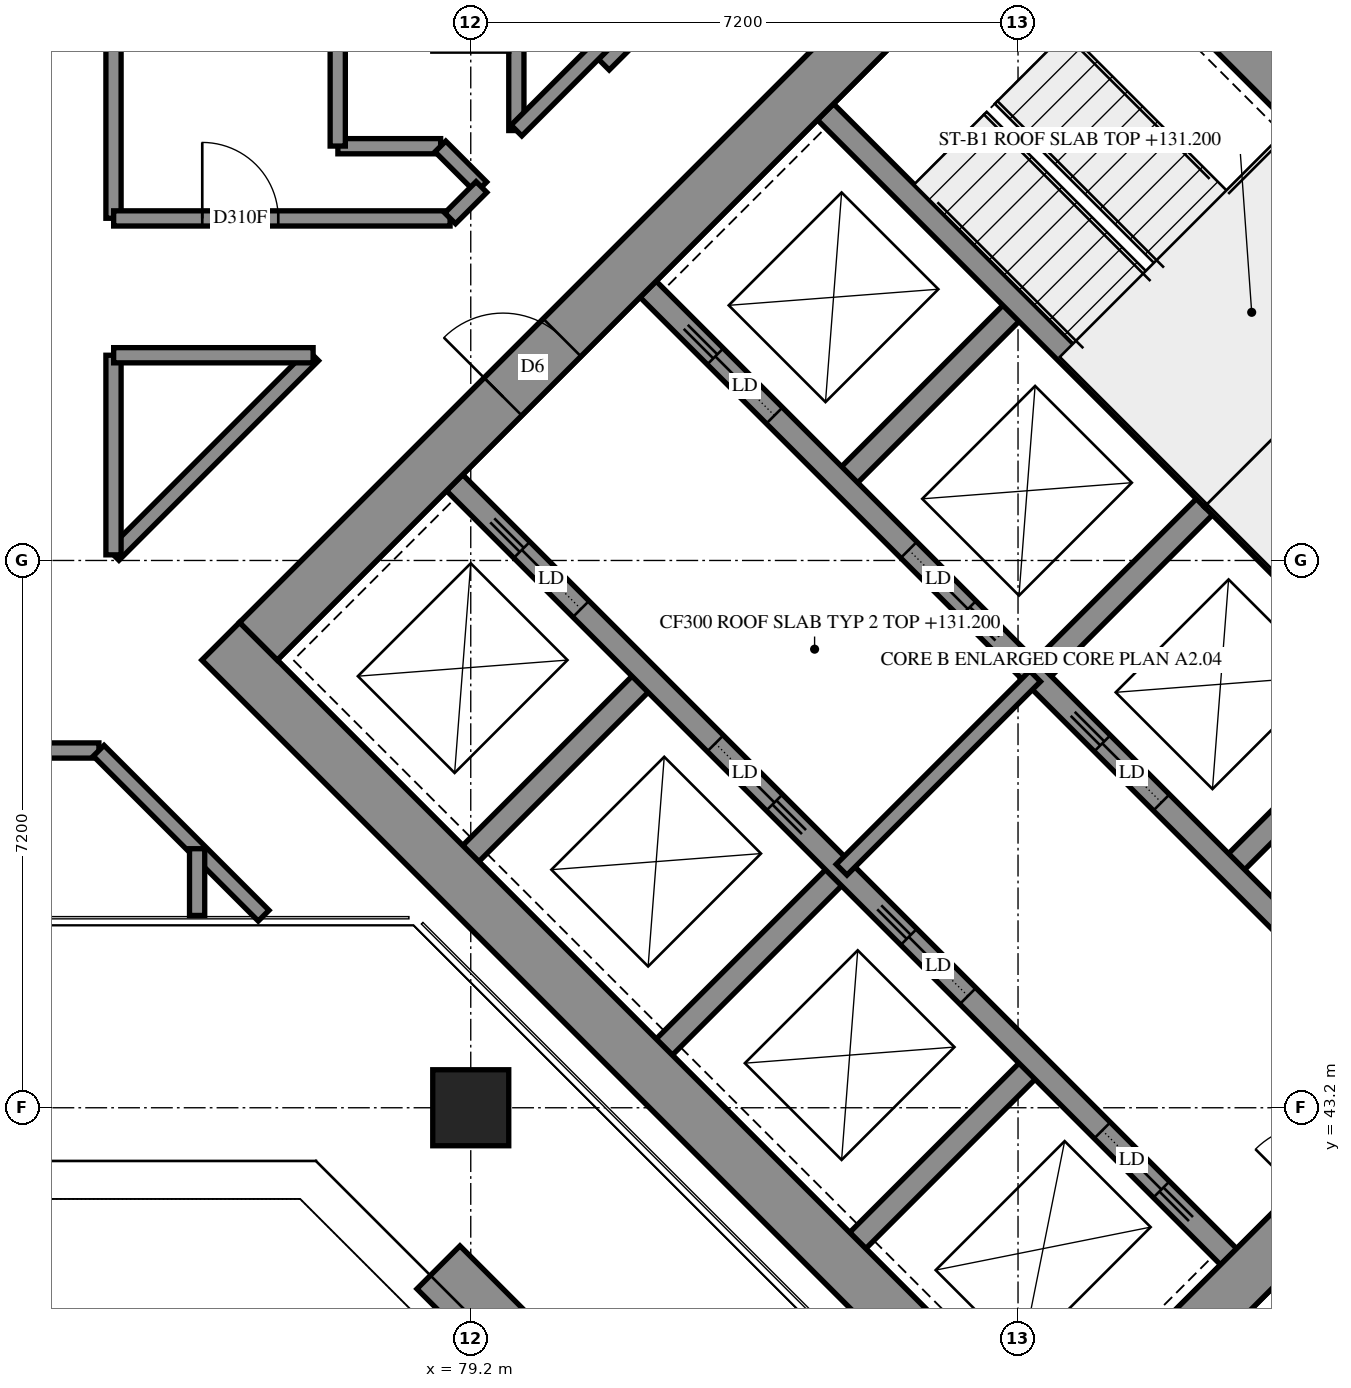
"""IFC4 building model, lengths in metres.
Left out: names, types, materials, properties, quantities, classifications, styles, units other than length and angle.
Written with IfcOpenShell. Run it as: python <this file> out.ifc"""

import sys

from ifc_helpers import new_model, si_unit, direction, frame, frame_2d, origin, origin_2d, place, context, subcontext, project, spatial, rectangle, extrude, element, fill, save


model = new_model("IFC4")
c1 = context("Model", 3, precision=1e-05, world=origin(), true_north=direction((0.0, 1.0)))
c2 = subcontext(c1, "Body", "Model", "MODEL_VIEW")
j1 = project(units=[si_unit("LENGTHUNIT", "METRE"), si_unit("PLANEANGLEUNIT", "RADIAN")], contexts=[c1])
p1 = place(None, origin())
s1 = spatial("IfcSite", under=j1, at=p1, CompositionType="ELEMENT")
p2 = place(p1, origin())
s2 = spatial("IfcBuilding", under=s1, at=p2, CompositionType="ELEMENT")
p3 = place(p2, frame((0.0, 0.0, 131.2)))
s3 = spatial("IfcBuildingStorey", under=s2, at=p3, CompositionType="ELEMENT", Elevation=131.2)
p4 = place(p3, frame((79.2, 43.2, 0.0), z_axis=(0.0, 0.0, 1.0), x_axis=(1.0, 0.0, 0.0)))
e1 = element("IfcColumn", 1, at=p4, inside=s3, PredefinedType="COLUMN", context=c2, shape_type="SweptSolid", body=[
    extrude(rectangle(XDim=1.0, YDim=1.0, at=origin_2d()), origin(), (0.0, 0.0, 1.0), 3.9),
])
p5 = place(p3, frame((75.912, 49.337, -0.3), z_axis=(0.0, 0.0, 1.0), x_axis=(0.7071036166, -0.7071099457, 0.0)))
e2 = element("IfcWall", 2, at=p5, inside=s3, PredefinedType="SHEAR", context=c2, shape_type="SweptSolid", body=[
    extrude(rectangle(XDim=15.8, YDim=0.7, at=frame_2d((7.9, 0.0))), origin(), (0.0, 0.0, 1.0), 3.5),
])
p6 = place(p3, frame((86.589, 60.014, -0.3), z_axis=(0.0, 0.0, 1.0), x_axis=(0.7071099457, -0.7071036166, 0.0)))
e3 = element("IfcWall", 3, at=p6, inside=s3, PredefinedType="SHEAR", context=c2, shape_type="SweptSolid", body=[
    extrude(rectangle(XDim=15.8, YDim=0.7, at=frame_2d((7.9, 0.0))), origin(), (0.0, 0.0, 1.0), 3.5),
])
p7 = place(p6, frame((10.7, 0.0, 0.3)))
e4 = element("IfcOpeningElement", 4, at=p7, cuts=e3, PredefinedType="OPENING", context=c2, shape_type="SweptSolid", body=[
    extrude(rectangle(XDim=0.8, YDim=2.1, at=frame_2d((0.4, 1.05))), frame((0.0, 0.36, 0.0), z_axis=(0.0, -1.0, 0.0), x_axis=(1.0, 0.0, 0.0)), (0.0, 0.0, 1.0), 0.72),
])
p8 = place(p3, frame((76.407, 49.337, -0.3), z_axis=(0.0, 0.0, 1.0), x_axis=(0.7071067812, 0.7071067812, 0.0)))
e5 = element("IfcWall", 5, at=p8, inside=s3, PredefinedType="SHEAR", context=c2, shape_type="SweptSolid", body=[
    extrude(rectangle(XDim=14.4, YDim=0.7, at=frame_2d((7.2, 0.0))), origin(), (0.0, 0.0, 1.0), 3.5),
])
p9 = place(p8, frame((4.55, 0.0, 0.3)))
e6 = element("IfcOpeningElement", 6, at=p9, cuts=e5, PredefinedType="OPENING", context=c2, shape_type="SweptSolid", body=[
    extrude(rectangle(XDim=1.1, YDim=2.1, at=frame_2d((0.55, 1.05))), frame((0.0, 0.36, 0.0), z_axis=(0.0, -1.0, 0.0), x_axis=(1.0, 0.0, 0.0)), (0.0, 0.0, 1.0), 0.72),
])
p10 = place(p8, frame((11.35, 0.0, 0.3)))
e7 = element("IfcOpeningElement", 7, at=p10, cuts=e5, PredefinedType="OPENING", context=c2, shape_type="SweptSolid", body=[
    extrude(rectangle(XDim=1.1, YDim=2.1, at=frame_2d((0.55, 1.05))), frame((0.0, 0.36, 0.0), z_axis=(0.0, -1.0, 0.0), x_axis=(1.0, 0.0, 0.0)), (0.0, 0.0, 1.0), 0.72),
])
p11 = place(p3, frame((87.084, 38.66, -0.3), z_axis=(0.0, 0.0, 1.0), x_axis=(0.7071067812, 0.7071067812, 0.0)))
e8 = element("IfcWall", 8, at=p11, inside=s3, PredefinedType="SHEAR", context=c2, shape_type="SweptSolid", body=[
    extrude(rectangle(XDim=14.4, YDim=0.7, at=frame_2d((7.2, 0.0))), origin(), (0.0, 0.0, 1.0), 3.5),
])
p12 = place(p11, frame((4.55, 0.0, 0.3)))
e9 = element("IfcOpeningElement", 9, at=p12, cuts=e8, PredefinedType="OPENING", context=c2, shape_type="SweptSolid", body=[
    extrude(rectangle(XDim=1.1, YDim=2.1, at=frame_2d((0.55, 1.05))), frame((0.0, 0.36, 0.0), z_axis=(0.0, -1.0, 0.0), x_axis=(1.0, 0.0, 0.0)), (0.0, 0.0, 1.0), 0.72),
])
p13 = place(p11, frame((11.35, 0.0, 0.3)))
e10 = element("IfcOpeningElement", 10, at=p13, cuts=e8, PredefinedType="OPENING", context=c2, shape_type="SweptSolid", body=[
    extrude(rectangle(XDim=1.1, YDim=2.1, at=frame_2d((0.55, 1.05))), frame((0.0, 0.36, 0.0), z_axis=(0.0, -1.0, 0.0), x_axis=(1.0, 0.0, 0.0)), (0.0, 0.0, 1.0), 0.72),
])
for number, where, z_axis, x_axis in (
    (11, (79.2, 46.544, 0.0), (0.0, 0.0, 1.0), (0.707, 0.707, 0.0)),
    (12, (84.079, 51.423, 0.0), (0.0, 0.0, 1.0), (0.707, 0.707, 0.0)),
):
    element("IfcWall", number, at=place(p3, frame(where, z_axis=z_axis, x_axis=x_axis)), inside=s3, PredefinedType="SOLIDWALL", context=c2, shape_type="SweptSolid", body=[
        extrude(rectangle(XDim=3.3, YDim=0.3, at=frame_2d((1.65, 0.0))), origin(), (0.0, 0.0, 1.0), 3.9),
    ])
p14 = place(p3, frame((81.746, 43.999, 0.0), z_axis=(0.0, 0.0, 1.0), x_axis=(0.7071067812, 0.7071067812, 0.0)))
e13 = element("IfcWall", 13, at=p14, inside=s3, PredefinedType="SOLIDWALL", context=c2, shape_type="SweptSolid", body=[
    extrude(rectangle(XDim=3.3, YDim=0.3, at=frame_2d((1.65, 0.0))), origin(), (0.0, 0.0, 1.0), 3.9),
])
p15 = place(p3, frame((86.625, 48.878, 0.0), z_axis=(0.0, 0.0, 1.0), x_axis=(0.7071067812, 0.7071067812, 0.0)))
e14 = element("IfcWall", 14, at=p15, inside=s3, PredefinedType="SOLIDWALL", context=c2, shape_type="SweptSolid", body=[
    extrude(rectangle(XDim=3.3, YDim=0.3, at=frame_2d((1.65, 0.0))), origin(), (0.0, 0.0, 1.0), 3.9),
])
p16 = place(p3, frame((84.291, 41.453, 0.0), z_axis=(0.0, 0.0, 1.0), x_axis=(0.7071067812, 0.7071067812, 0.0)))
e15 = element("IfcWall", 15, at=p16, inside=s3, PredefinedType="SOLIDWALL", context=c2, shape_type="SweptSolid", body=[
    extrude(rectangle(XDim=3.3, YDim=0.3, at=frame_2d((1.65, 0.0))), origin(), (0.0, 0.0, 1.0), 3.9),
])
p17 = place(p3, frame((89.17, 46.332, 0.0), z_axis=(0.0, 0.0, 1.0), x_axis=(0.7071067812, 0.7071067812, 0.0)))
e16 = element("IfcWall", 16, at=p17, inside=s3, PredefinedType="SOLIDWALL", context=c2, shape_type="SweptSolid", body=[
    extrude(rectangle(XDim=3.3, YDim=0.3, at=frame_2d((1.65, 0.0))), origin(), (0.0, 0.0, 1.0), 3.9),
])
p18 = place(p3, frame((78.988, 51.423, 0.0), z_axis=(0.0, 0.0, 1.0), x_axis=(0.7071067812, -0.7071067812, 0.0)))
e17 = element("IfcWall", 17, at=p18, inside=s3, PredefinedType="SOLIDWALL", context=c2, shape_type="SweptSolid", body=[
    extrude(rectangle(XDim=14.4, YDim=0.3, at=frame_2d((7.2, 0.0))), origin(), (0.0, 0.0, 1.0), 3.9),
])
p19 = place(p18, frame((1.25, 0.0, 0.0)))
e18 = element("IfcOpeningElement", 18, at=p19, cuts=e17, PredefinedType="OPENING", context=c2, shape_type="SweptSolid", body=[
    extrude(rectangle(XDim=1.1, YDim=2.1, at=frame_2d((0.55, 1.05))), frame((0.0, 0.16, 0.0), z_axis=(0.0, -1.0, 0.0), x_axis=(1.0, 0.0, 0.0)), (0.0, 0.0, 1.0), 0.32),
])
p20 = place(p18, frame((4.85, 0.0, 0.0)))
e19 = element("IfcOpeningElement", 19, at=p20, cuts=e17, PredefinedType="OPENING", context=c2, shape_type="SweptSolid", body=[
    extrude(rectangle(XDim=1.1, YDim=2.1, at=frame_2d((0.55, 1.05))), frame((0.0, 0.16, 0.0), z_axis=(0.0, -1.0, 0.0), x_axis=(1.0, 0.0, 0.0)), (0.0, 0.0, 1.0), 0.32),
])
p21 = place(p18, frame((8.45, 0.0, 0.0)))
e20 = element("IfcOpeningElement", 20, at=p21, cuts=e17, PredefinedType="OPENING", context=c2, shape_type="SweptSolid", body=[
    extrude(rectangle(XDim=1.1, YDim=2.1, at=frame_2d((0.55, 1.05))), frame((0.0, 0.16, 0.0), z_axis=(0.0, -1.0, 0.0), x_axis=(1.0, 0.0, 0.0)), (0.0, 0.0, 1.0), 0.32),
])
p22 = place(p18, frame((12.05, 0.0, 0.0)))
e21 = element("IfcOpeningElement", 21, at=p22, cuts=e17, PredefinedType="OPENING", context=c2, shape_type="SweptSolid", body=[
    extrude(rectangle(XDim=1.1, YDim=2.1, at=frame_2d((0.55, 1.05))), frame((0.0, 0.16, 0.0), z_axis=(0.0, -1.0, 0.0), x_axis=(1.0, 0.0, 0.0)), (0.0, 0.0, 1.0), 0.32),
])
p23 = place(p3, frame((81.534, 53.969, 0.0), z_axis=(0.0, 0.0, 1.0), x_axis=(0.707103309, -0.7071102534, 0.0)))
e22 = element("IfcWall", 22, at=p23, inside=s3, PredefinedType="SOLIDWALL", context=c2, shape_type="SweptSolid", body=[
    extrude(rectangle(XDim=14.4, YDim=0.3, at=frame_2d((7.2, 0.0))), origin(), (0.0, 0.0, 1.0), 3.9),
])
p24 = place(p23, frame((1.25, 0.0, 0.0)))
e23 = element("IfcOpeningElement", 23, at=p24, cuts=e22, PredefinedType="OPENING", context=c2, shape_type="SweptSolid", body=[
    extrude(rectangle(XDim=1.1, YDim=2.1, at=frame_2d((0.55, 1.05))), frame((0.0, 0.16, 0.0), z_axis=(0.0, -1.0, 0.0), x_axis=(1.0, 0.0, 0.0)), (0.0, 0.0, 1.0), 0.32),
])
p25 = place(p23, frame((4.85, 0.0, 0.0)))
e24 = element("IfcOpeningElement", 24, at=p25, cuts=e22, PredefinedType="OPENING", context=c2, shape_type="SweptSolid", body=[
    extrude(rectangle(XDim=1.1, YDim=2.1, at=frame_2d((0.55, 1.05))), frame((0.0, 0.16, 0.0), z_axis=(0.0, -1.0, 0.0), x_axis=(1.0, 0.0, 0.0)), (0.0, 0.0, 1.0), 0.32),
])
p26 = place(p23, frame((8.45, 0.0, 0.0)))
e25 = element("IfcOpeningElement", 25, at=p26, cuts=e22, PredefinedType="OPENING", context=c2, shape_type="SweptSolid", body=[
    extrude(rectangle(XDim=1.1, YDim=2.1, at=frame_2d((0.55, 1.05))), frame((0.0, 0.16, 0.0), z_axis=(0.0, -1.0, 0.0), x_axis=(1.0, 0.0, 0.0)), (0.0, 0.0, 1.0), 0.32),
])
p27 = place(p23, frame((12.05, 0.0, 0.0)))
e26 = element("IfcOpeningElement", 26, at=p27, cuts=e22, PredefinedType="OPENING", context=c2, shape_type="SweptSolid", body=[
    extrude(rectangle(XDim=1.1, YDim=2.1, at=frame_2d((0.55, 1.05))), frame((0.0, 0.16, 0.0), z_axis=(0.0, -1.0, 0.0), x_axis=(1.0, 0.0, 0.0)), (0.0, 0.0, 1.0), 0.32),
])
for number, where, z_axis, x_axis in (
    (27, (83.867, 56.302, 0.0), (0.0, 0.0, 1.0), (0.707, -0.707, 0.0)),
    (28, (88.958, 51.211, 0.0), (0.0, 0.0, 1.0), (0.707, -0.707, 0.0)),
):
    element("IfcWall", number, at=place(p3, frame(where, z_axis=z_axis, x_axis=x_axis)), inside=s3, PredefinedType="SOLIDWALL", context=c2, shape_type="SweptSolid", body=[
        extrude(rectangle(XDim=7.2, YDim=0.3, at=frame_2d((3.6, 0.0))), origin(), (0.0, 0.0, 1.0), 3.9),
    ])
p28 = place(p3, frame((88.958, 51.211, 0.0), z_axis=(0.0, 0.0, 1.0), x_axis=(0.7071067812, 0.7071067812, 0.0)))
e29 = element("IfcWall", 29, at=p28, inside=s3, PredefinedType="SOLIDWALL", context=c2, shape_type="SweptSolid", body=[
    extrude(rectangle(XDim=4.2, YDim=0.3, at=frame_2d((2.1, 0.0))), origin(), (0.0, 0.0, 1.0), 3.9),
])
p29 = place(p3, frame((78.775, 41.1, 0.0), z_axis=(0.0, 0.0, 1.0), x_axis=(0.7071067812, -0.7071067812, 0.0)))
e30 = element("IfcWall", 30, at=p29, inside=s3, PredefinedType="SOLIDWALL", context=c2, shape_type="SweptSolid", body=[
    extrude(rectangle(XDim=4.831, YDim=0.8, at=frame_2d((2.416, 0.0))), origin(), (0.0, 0.0, 1.0), 0.65),
])
p30 = place(p3, frame((84.079, 46.332, 0.0), z_axis=(0.0, 0.0, 1.0), x_axis=(0.7071067812, 0.7071067812, 0.0)))
e31 = element("IfcWall", 31, at=p30, inside=s3, PredefinedType="PARTITIONING", context=c2, shape_type="SweptSolid", body=[
    extrude(rectangle(XDim=3.6, YDim=0.2, at=frame_2d((1.8, 0.0))), origin(), (0.0, 0.0, 1.0), 3.9),
])
p31 = place(p3, frame((55.1, 47.9, 0.0), z_axis=(0.0, 0.0, 1.0), x_axis=(1.0, 0.0, 0.0)))
e32 = element("IfcWall", 32, at=p31, inside=s3, PredefinedType="PARTITIONING", context=c2, shape_type="SweptSolid", body=[
    extrude(rectangle(XDim=19.208, YDim=0.2, at=frame_2d((9.604, 0.0))), origin(), (0.0, 0.0, 1.0), 3.9),
])
p32 = place(p3, frame((87.847, 36.383, 0.0), z_axis=(0.0, 0.0, 1.0), x_axis=(0.7071067812, 0.7071067812, 0.0)))
e33 = element("IfcWall", 33, at=p32, inside=s3, PredefinedType="PARTITIONING", context=c2, shape_type="SweptSolid", body=[
    extrude(rectangle(XDim=7.371, YDim=0.2, at=frame_2d((3.685, 0.0))), origin(), (0.0, 0.0, 1.0), 3.9),
])
p33 = place(p3, frame((80.951, 56.923, 0.0), z_axis=(0.0, 0.0, 1.0), x_axis=(0.7071067812, 0.7071067812, 0.0)))
e34 = element("IfcWall", 34, at=p33, inside=s3, PredefinedType="PARTITIONING", context=c2, shape_type="SweptSolid", body=[
    extrude(rectangle(XDim=6.893, YDim=0.2, at=frame_2d((3.446, 0.0))), origin(), (0.0, 0.0, 1.0), 3.9),
])
p34 = place(p33, frame((0.832, 0.0, 0.0)))
e35 = element("IfcOpeningElement", 35, at=p34, cuts=e34, PredefinedType="OPENING", context=c2, shape_type="SweptSolid", body=[
    extrude(rectangle(XDim=1.0, YDim=2.1, at=frame_2d((0.5, 1.05))), frame((0.0, 0.11, 0.0), z_axis=(0.0, -1.0, 0.0), x_axis=(1.0, 0.0, 0.0)), (0.0, 0.0, 1.0), 0.22),
])
p35 = place(p3, frame((74.5, 54.902, 0.0), z_axis=(0.0, 0.0, 1.0), x_axis=(0.0, 1.0, 0.0)))
e36 = element("IfcWall", 36, at=p35, inside=s3, PredefinedType="PARTITIONING", context=c2, shape_type="SweptSolid", body=[
    extrude(rectangle(XDim=5.25, YDim=0.2, at=frame_2d((2.625, 0.0))), origin(), (0.0, 0.0, 1.0), 3.9),
])
p36 = place(p3, frame((74.502, 54.9, 0.0), z_axis=(0.0, 0.0, 1.0), x_axis=(1.0, 0.0, 0.0)))
e37 = element("IfcWall", 37, at=p36, inside=s3, PredefinedType="PARTITIONING", context=c2, shape_type="SweptSolid", body=[
    extrude(rectangle(XDim=4.426, YDim=0.2, at=frame_2d((2.213, 0.0))), origin(), (0.0, 0.0, 1.0), 3.9),
])
p37 = place(p36, frame((1.166, 0.0, 0.0)))
e38 = element("IfcOpeningElement", 38, at=p37, cuts=e37, PredefinedType="OPENING", context=c2, shape_type="SweptSolid", body=[
    extrude(rectangle(XDim=1.0, YDim=2.1, at=frame_2d((0.5, 1.05))), frame((0.0, 0.11, 0.0), z_axis=(0.0, -1.0, 0.0), x_axis=(1.0, 0.0, 0.0)), (0.0, 0.0, 1.0), 0.22),
])
p38 = place(p3, frame((74.501, 50.473, 0.0), z_axis=(0.0, 0.0, 1.0), x_axis=(0.7071067812, 0.7071067812, 0.0)))
e39 = element("IfcWall", 39, at=p38, inside=s3, PredefinedType="PARTITIONING", context=c2, shape_type="SweptSolid", body=[
    extrude(rectangle(XDim=3.714, YDim=0.2, at=frame_2d((1.857, 0.0))), origin(), (0.0, 0.0, 1.0), 3.9),
])
p39 = place(p3, frame((79.8, 56.056, 0.0), z_axis=(0.0, 0.0, 1.0), x_axis=(0.0, 1.0, 0.0)))
e40 = element("IfcWall", 40, at=p39, inside=s3, PredefinedType="PARTITIONING", context=c2, shape_type="SweptSolid", body=[
    extrude(rectangle(XDim=3.294, YDim=0.2, at=frame_2d((1.647, 0.0))), origin(), (0.0, 0.0, 1.0), 3.9),
])
p40 = place(p3, frame((74.305, 47.897, 0.0), z_axis=(0.0, 0.0, 1.0), x_axis=(0.7071067812, -0.7071067812, 0.0)))
e41 = element("IfcWall", 41, at=p40, inside=s3, PredefinedType="PARTITIONING", context=c2, shape_type="SweptSolid", body=[
    extrude(rectangle(XDim=3.069, YDim=0.2, at=frame_2d((1.534, 0.0))), origin(), (0.0, 0.0, 1.0), 3.9),
])
p41 = place(p3, frame((74.5, 50.474, 0.0), z_axis=(0.0, 0.0, 1.0), x_axis=(0.0, 1.0, 0.0)))
e42 = element("IfcWall", 42, at=p41, inside=s3, PredefinedType="PARTITIONING", context=c2, shape_type="SweptSolid", body=[
    extrude(rectangle(XDim=2.626, YDim=0.2, at=frame_2d((1.313, 0.0))), origin(), (0.0, 0.0, 1.0), 3.9),
])
p42 = place(p3, frame((74.502, 53.1, 0.0), z_axis=(0.0, 0.0, 1.0), x_axis=(1.0, 0.0, 0.0)))
e43 = element("IfcWall", 43, at=p42, inside=s3, PredefinedType="PARTITIONING", context=c2, shape_type="SweptSolid", body=[
    extrude(rectangle(XDim=2.624, YDim=0.2, at=frame_2d((1.312, 0.0))), origin(), (0.0, 0.0, 1.0), 3.9),
])
p43 = place(p3, frame((79.801, 56.057, 0.0), z_axis=(0.0, 0.0, 1.0), x_axis=(0.7071067812, 0.7071067812, 0.0)))
e44 = element("IfcWall", 44, at=p43, inside=s3, PredefinedType="PARTITIONING", context=c2, shape_type="SweptSolid", body=[
    extrude(rectangle(XDim=1.623, YDim=0.2, at=frame_2d((0.812, 0.0))), origin(), (0.0, 0.0, 1.0), 3.9),
])
for number, where, z_axis, x_axis in (
    (45, (77.452, 55.85, 0.0), (0.0, 0.0, 1.0), (1.0, 0.0, 0.0)),
    (46, (77.45, 55.852, 0.0), (0.0, 0.0, 1.0), (0.0, 1.0, 0.0)),
):
    element("IfcWall", number, at=place(p3, frame(where, z_axis=z_axis, x_axis=x_axis)), inside=s3, PredefinedType="PARTITIONING", context=c2, shape_type="SweptSolid", body=[
        extrude(rectangle(XDim=1.352, YDim=0.2, at=frame_2d((0.676, 0.0))), origin(), (0.0, 0.0, 1.0), 3.9),
    ])
p44 = place(p3, frame((75.6, 45.73, 0.0), z_axis=(0.0, 0.0, 1.0), x_axis=(0.0, 1.0, 0.0)))
e47 = element("IfcWall", 47, at=p44, inside=s3, PredefinedType="PARTITIONING", context=c2, shape_type="SweptSolid", body=[
    extrude(rectangle(XDim=0.878, YDim=0.2, at=frame_2d((0.439, 0.0))), origin(), (0.0, 0.0, 1.0), 3.9),
])
p45 = place(p3, frame((78.801, 55.847, 0.0), z_axis=(0.0, 0.0, 1.0), x_axis=(0.7071067812, -0.7071067812, 0.0)))
e48 = element("IfcWall", 48, at=p45, inside=s3, PredefinedType="PARTITIONING", context=c2, shape_type="SweptSolid", body=[
    extrude(rectangle(XDim=0.761, YDim=0.2, at=frame_2d((0.38, 0.0))), origin(), (0.0, 0.0, 1.0), 3.9),
])
p46 = place(p3, frame((78.929, 54.901, 0.0), z_axis=(0.0, 0.0, 1.0), x_axis=(0.7071067812, 0.7071067812, 0.0)))
e49 = element("IfcWall", 49, at=p46, inside=s3, PredefinedType="PARTITIONING", context=c2, shape_type="SweptSolid", body=[
    extrude(rectangle(XDim=0.583, YDim=0.2, at=frame_2d((0.291, 0.0))), origin(), (0.0, 0.0, 1.0), 3.9),
])
p47 = place(p9, origin())
e50 = element("IfcDoor", 50, at=p47, inside=s3, OperationType="DOUBLE_DOOR_SINGLE_SWING", PredefinedType="DOOR", context=c2, shape_type="SweptSolid", body=[
    extrude(rectangle(XDim=1.1, YDim=2.1, at=frame_2d((0.55, 1.05))), frame((0.0, 0.025, 0.0), z_axis=(0.0, -1.0, 0.0), x_axis=(1.0, 0.0, 0.0)), (0.0, 0.0, 1.0), 0.05),
])
fill(e6, e50)
p48 = place(p19, origin())
e51 = element("IfcDoor", 51, at=p48, inside=s3, OperationType="SLIDING_TO_LEFT", PredefinedType="DOOR", context=c2, shape_type="SweptSolid", body=[
    extrude(rectangle(XDim=1.1, YDim=2.1, at=frame_2d((0.55, 1.05))), frame((0.0, 0.025, 0.0), z_axis=(0.0, -1.0, 0.0), x_axis=(1.0, 0.0, 0.0)), (0.0, 0.0, 1.0), 0.05),
])
fill(e18, e51)
p49 = place(p20, origin())
e52 = element("IfcDoor", 52, at=p49, inside=s3, OperationType="SLIDING_TO_RIGHT", PredefinedType="DOOR", context=c2, shape_type="SweptSolid", body=[
    extrude(rectangle(XDim=1.1, YDim=2.1, at=frame_2d((0.55, 1.05))), frame((0.0, 0.025, 0.0), z_axis=(0.0, -1.0, 0.0), x_axis=(1.0, 0.0, 0.0)), (0.0, 0.0, 1.0), 0.05),
])
fill(e19, e52)
p50 = place(p21, origin())
e53 = element("IfcDoor", 53, at=p50, inside=s3, OperationType="SLIDING_TO_LEFT", PredefinedType="DOOR", context=c2, shape_type="SweptSolid", body=[
    extrude(rectangle(XDim=1.1, YDim=2.1, at=frame_2d((0.55, 1.05))), frame((0.0, 0.025, 0.0), z_axis=(0.0, -1.0, 0.0), x_axis=(1.0, 0.0, 0.0)), (0.0, 0.0, 1.0), 0.05),
])
fill(e20, e53)
p51 = place(p22, origin())
e54 = element("IfcDoor", 54, at=p51, inside=s3, OperationType="SLIDING_TO_RIGHT", PredefinedType="DOOR", context=c2, shape_type="SweptSolid", body=[
    extrude(rectangle(XDim=1.1, YDim=2.1, at=frame_2d((0.55, 1.05))), frame((0.0, 0.025, 0.0), z_axis=(0.0, -1.0, 0.0), x_axis=(1.0, 0.0, 0.0)), (0.0, 0.0, 1.0), 0.05),
])
fill(e21, e54)
p52 = place(p24, origin())
e55 = element("IfcDoor", 55, at=p52, inside=s3, OperationType="SLIDING_TO_LEFT", PredefinedType="DOOR", context=c2, shape_type="SweptSolid", body=[
    extrude(rectangle(XDim=1.1, YDim=2.1, at=frame_2d((0.55, 1.05))), frame((0.0, 0.025, 0.0), z_axis=(0.0, -1.0, 0.0), x_axis=(1.0, 0.0, 0.0)), (0.0, 0.0, 1.0), 0.05),
])
fill(e23, e55)
p53 = place(p25, origin())
e56 = element("IfcDoor", 56, at=p53, inside=s3, OperationType="SLIDING_TO_RIGHT", PredefinedType="DOOR", context=c2, shape_type="SweptSolid", body=[
    extrude(rectangle(XDim=1.1, YDim=2.1, at=frame_2d((0.55, 1.05))), frame((0.0, 0.025, 0.0), z_axis=(0.0, -1.0, 0.0), x_axis=(1.0, 0.0, 0.0)), (0.0, 0.0, 1.0), 0.05),
])
fill(e24, e56)
p54 = place(p26, origin())
e57 = element("IfcDoor", 57, at=p54, inside=s3, OperationType="SLIDING_TO_LEFT", PredefinedType="DOOR", context=c2, shape_type="SweptSolid", body=[
    extrude(rectangle(XDim=1.1, YDim=2.1, at=frame_2d((0.55, 1.05))), frame((0.0, 0.025, 0.0), z_axis=(0.0, -1.0, 0.0), x_axis=(1.0, 0.0, 0.0)), (0.0, 0.0, 1.0), 0.05),
])
fill(e25, e57)
p55 = place(p37, origin())
e58 = element("IfcDoor", 58, at=p55, inside=s3, OperationType="SINGLE_SWING_LEFT", PredefinedType="DOOR", context=c2, shape_type="SweptSolid", body=[
    extrude(rectangle(XDim=1.0, YDim=2.1, at=frame_2d((0.5, 1.05))), frame((0.0, 0.025, 0.0), z_axis=(0.0, -1.0, 0.0), x_axis=(1.0, 0.0, 0.0)), (0.0, 0.0, 1.0), 0.05),
])
fill(e38, e58)
save(model, sys.argv[1])
